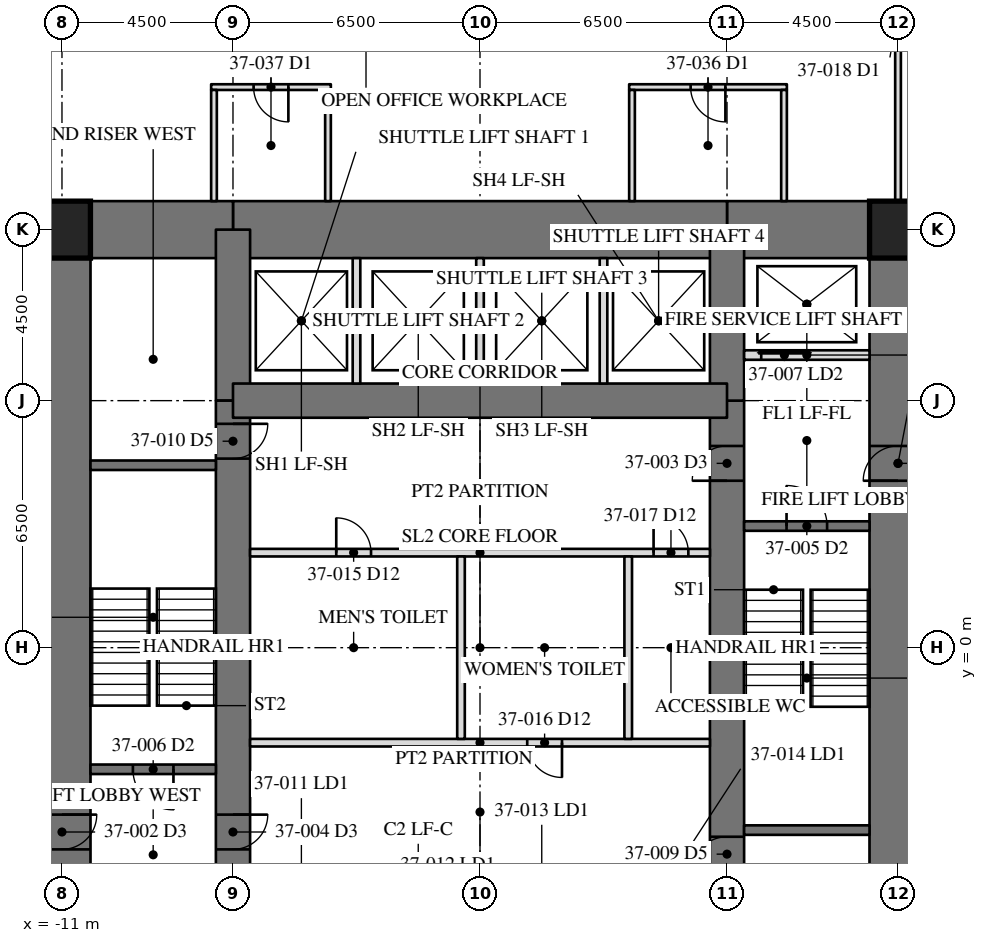
"""IFC4 building model, lengths in metres.
Left out: names, types, materials, properties, quantities, classifications, styles, units other than length and angle.
Written with IfcOpenShell. Run it as: python <this file> out.ifc"""

import sys

from ifc_helpers import new_model, si_unit, direction, frame, frame_2d, origin, origin_2d, place, context, subcontext, project, spatial, rectangle, hollow_rectangle, extrude, element, fill, save


model = new_model("IFC4")
c1 = context("Model", 3, precision=1e-05, world=origin(), true_north=direction((0.0, 1.0)))
c2 = subcontext(c1, "Body", "Model", "MODEL_VIEW")
j1 = project(units=[si_unit("LENGTHUNIT", "METRE"), si_unit("PLANEANGLEUNIT", "RADIAN")], contexts=[c1])
p1 = place(None, origin())
s1 = spatial("IfcSite", under=j1, at=p1, CompositionType="ELEMENT")
p2 = place(p1, origin())
s2 = spatial("IfcBuilding", under=s1, at=p2, CompositionType="ELEMENT")
p3 = place(p2, frame((0.0, 0.0, 158.2)))
s3 = spatial("IfcBuildingStorey", under=s2, at=p3, CompositionType="ELEMENT", Elevation=158.2)
p4 = place(p3, frame((11.0, -11.0, 0.0), z_axis=(0.0, 0.0, 1.0), x_axis=(0.0, 1.0, 0.0)))
e1 = element("IfcWall", 1, at=p4, inside=s3, PredefinedType="SHEAR", context=c2, shape_type="SweptSolid", body=[
    extrude(rectangle(XDim=22.0, YDim=1.5, at=frame_2d((11.0, 0.0))), origin(), (0.0, 0.0, 1.0), 4.1),
])
p5 = place(p4, frame((15.393, 0.0, 0.0)))
e2 = element("IfcOpeningElement", 2, at=p5, cuts=e1, PredefinedType="OPENING", context=c2, shape_type="SweptSolid", body=[
    extrude(rectangle(XDim=0.915, YDim=2.134, at=frame_2d((0.458, 1.067))), frame((0.0, 0.76, 0.0), z_axis=(0.0, -1.0, 0.0), x_axis=(1.0, 0.0, 0.0)), (0.0, 0.0, 1.0), 1.52),
])
p6 = place(p3, frame((-11.0, 11.0, 0.0), z_axis=(0.0, 0.0, 1.0), x_axis=(0.0, -1.0, 0.0)))
e3 = element("IfcWall", 3, at=p6, inside=s3, PredefinedType="SHEAR", context=c2, shape_type="SweptSolid", body=[
    extrude(rectangle(XDim=22.0, YDim=1.5, at=frame_2d((11.0, 0.0))), origin(), (0.0, 0.0, 1.0), 4.1),
])
p7 = place(p6, frame((15.393, 0.0, 0.0)))
e4 = element("IfcOpeningElement", 4, at=p7, cuts=e3, PredefinedType="OPENING", context=c2, shape_type="SweptSolid", body=[
    extrude(rectangle(XDim=0.915, YDim=2.134, at=frame_2d((0.458, 1.067))), frame((0.0, 0.76, 0.0), z_axis=(0.0, -1.0, 0.0), x_axis=(1.0, 0.0, 0.0)), (0.0, 0.0, 1.0), 1.52),
])
p8 = place(p3, frame((11.0, 11.0, 0.0), z_axis=(0.0, 0.0, 1.0), x_axis=(-1.0, 0.0, 0.0)))
e5 = element("IfcWall", 5, at=p8, inside=s3, PredefinedType="SHEAR", context=c2, shape_type="SweptSolid", body=[
    extrude(rectangle(XDim=4.5, YDim=1.5, at=frame_2d((2.25, 0.0))), origin(), (0.0, 0.0, 1.0), 4.1),
])
p9 = place(p3, frame((6.5, 11.0, 0.0), z_axis=(0.0, 0.0, 1.0), x_axis=(-1.0, 0.0, 0.0)))
e6 = element("IfcWall", 6, at=p9, inside=s3, PredefinedType="SHEAR", context=c2, shape_type="SweptSolid", body=[
    extrude(rectangle(XDim=13.0, YDim=1.5, at=frame_2d((6.5, 0.0))), origin(), (0.0, 0.0, 1.0), 4.1),
])
p10 = place(p3, frame((-6.5, 11.0, 0.0), z_axis=(0.0, 0.0, 1.0), x_axis=(-1.0, 0.0, 0.0)))
e7 = element("IfcWall", 7, at=p10, inside=s3, PredefinedType="SHEAR", context=c2, shape_type="SweptSolid", body=[
    extrude(rectangle(XDim=4.5, YDim=1.5, at=frame_2d((2.25, 0.0))), origin(), (0.0, 0.0, 1.0), 4.1),
])
p11 = place(p3, frame((6.5, -6.5, 0.0), z_axis=(0.0, 0.0, 1.0), x_axis=(0.0, 1.0, 0.0)))
e8 = element("IfcWall", 8, at=p11, inside=s3, PredefinedType="SHEAR", context=c2, shape_type="SweptSolid", body=[
    extrude(rectangle(XDim=13.0, YDim=0.9, at=frame_2d((6.5, 0.0))), origin(), (0.0, 0.0, 1.0), 4.1),
])
p12 = place(p11, frame((10.893, 0.0, 0.0)))
e9 = element("IfcOpeningElement", 9, at=p12, cuts=e8, PredefinedType="OPENING", context=c2, shape_type="SweptSolid", body=[
    extrude(rectangle(XDim=0.915, YDim=2.134, at=frame_2d((0.458, 1.067))), frame((0.0, 0.46, 0.0), z_axis=(0.0, -1.0, 0.0), x_axis=(1.0, 0.0, 0.0)), (0.0, 0.0, 1.0), 0.92),
])
p13 = place(p11, frame((0.61, 0.0, 0.0)))
e10 = element("IfcOpeningElement", 10, at=p13, cuts=e8, PredefinedType="OPENING", context=c2, shape_type="SweptSolid", body=[
    extrude(rectangle(XDim=0.915, YDim=2.134, at=frame_2d((0.458, 1.067))), frame((0.0, 0.46, 0.0), z_axis=(0.0, -1.0, 0.0), x_axis=(1.0, 0.0, 0.0)), (0.0, 0.0, 1.0), 0.92),
])
for number, where, z_axis, x_axis in (
    (11, (6.5, 6.5, 0.0), (0.0, 0.0, 1.0), (0.0, 1.0, 0.0)),
    (12, (-6.5, 11.0, 0.0), (0.0, 0.0, 1.0), (0.0, -1.0, 0.0)),
):
    element("IfcWall", number, at=place(p3, frame(where, z_axis=z_axis, x_axis=x_axis)), inside=s3, PredefinedType="SHEAR", context=c2, shape_type="SweptSolid", body=[
        extrude(rectangle(XDim=4.5, YDim=0.9, at=frame_2d((2.25, 0.0))), origin(), (0.0, 0.0, 1.0), 4.1),
    ])
p14 = place(p3, frame((-6.5, 6.5, 0.0), z_axis=(0.0, 0.0, 1.0), x_axis=(0.0, -1.0, 0.0)))
e13 = element("IfcWall", 13, at=p14, inside=s3, PredefinedType="SHEAR", context=c2, shape_type="SweptSolid", body=[
    extrude(rectangle(XDim=13.0, YDim=0.9, at=frame_2d((6.5, 0.0))), origin(), (0.0, 0.0, 1.0), 4.1),
])
p15 = place(p14, frame((10.893, 0.0, 0.0)))
e14 = element("IfcOpeningElement", 14, at=p15, cuts=e13, PredefinedType="OPENING", context=c2, shape_type="SweptSolid", body=[
    extrude(rectangle(XDim=0.915, YDim=2.134, at=frame_2d((0.458, 1.067))), frame((0.0, 0.46, 0.0), z_axis=(0.0, -1.0, 0.0), x_axis=(1.0, 0.0, 0.0)), (0.0, 0.0, 1.0), 0.92),
])
p16 = place(p14, frame((0.61, 0.0, 0.0)))
e15 = element("IfcOpeningElement", 15, at=p16, cuts=e13, PredefinedType="OPENING", context=c2, shape_type="SweptSolid", body=[
    extrude(rectangle(XDim=0.915, YDim=2.134, at=frame_2d((0.458, 1.067))), frame((0.0, 0.46, 0.0), z_axis=(0.0, -1.0, 0.0), x_axis=(1.0, 0.0, 0.0)), (0.0, 0.0, 1.0), 0.92),
])
p17 = place(p3, frame((6.5, 6.5, 0.0), z_axis=(0.0, 0.0, 1.0), x_axis=(-1.0, 0.0, 0.0)))
e16 = element("IfcWall", 16, at=p17, inside=s3, PredefinedType="SHEAR", context=c2, shape_type="SweptSolid", body=[
    extrude(rectangle(XDim=13.0, YDim=0.9, at=frame_2d((6.5, 0.0))), origin(), (0.0, 0.0, 1.0), 4.1),
])
for number, where, z_axis, x_axis in (
    (17, (11.0, 11.0, 0.0), (0.0, 0.0, 1.0), (1.0, 0.0, 0.0)),
    (18, (-11.0, 11.0, 0.0), (0.0, 0.0, 1.0), (1.0, 0.0, 0.0)),
):
    element("IfcColumn", number, at=place(p3, frame(where, z_axis=z_axis, x_axis=x_axis)), inside=s3, PredefinedType="COLUMN", context=c2, shape_type="SweptSolid", body=[
        extrude(hollow_rectangle(XDim=1.499, YDim=1.499, WallThickness=0.102, at=origin_2d()), origin(), (0.0, 0.0, 1.0), 4.1),
    ])
for number, where, z_axis, x_axis in (
    (19, (6.95, -4.8, 0.0), (0.0, 0.0, 1.0), (1.0, 0.0, 0.0)),
    (20, (-6.95, 4.8, 0.0), (0.0, 0.0, 1.0), (-1.0, 0.0, 0.0)),
):
    element("IfcWall", number, at=place(p3, frame(where, z_axis=z_axis, x_axis=x_axis)), inside=s3, PredefinedType="SOLIDWALL", context=c2, shape_type="SweptSolid", body=[
        extrude(rectangle(XDim=3.3, YDim=0.25, at=frame_2d((1.65, 0.0))), origin(), (0.0, 0.0, 1.0), 3.91),
    ])
p18 = place(p3, frame((6.95, 3.2, 0.0), z_axis=(0.0, 0.0, 1.0), x_axis=(1.0, 0.0, 0.0)))
e21 = element("IfcWall", 21, at=p18, inside=s3, PredefinedType="SOLIDWALL", context=c2, shape_type="SweptSolid", body=[
    extrude(rectangle(XDim=3.3, YDim=0.25, at=frame_2d((1.65, 0.0))), origin(), (0.0, 0.0, 1.0), 3.91),
])
p19 = place(p18, frame((1.116, 0.0, 0.0)))
e22 = element("IfcOpeningElement", 22, at=p19, cuts=e21, PredefinedType="OPENING", context=c2, shape_type="SweptSolid", body=[
    extrude(rectangle(XDim=1.067, YDim=2.134, at=frame_2d((0.533, 1.067))), frame((0.0, 0.135, 0.0), z_axis=(0.0, -1.0, 0.0), x_axis=(1.0, 0.0, 0.0)), (0.0, 0.0, 1.0), 0.27),
])
p20 = place(p3, frame((-6.95, -3.2, 0.0), z_axis=(0.0, 0.0, 1.0), x_axis=(-1.0, 0.0, 0.0)))
e23 = element("IfcWall", 23, at=p20, inside=s3, PredefinedType="SOLIDWALL", context=c2, shape_type="SweptSolid", body=[
    extrude(rectangle(XDim=3.3, YDim=0.25, at=frame_2d((1.65, 0.0))), origin(), (0.0, 0.0, 1.0), 3.91),
])
p21 = place(p20, frame((1.116, 0.0, 0.0)))
e24 = element("IfcOpeningElement", 24, at=p21, cuts=e23, PredefinedType="OPENING", context=c2, shape_type="SweptSolid", body=[
    extrude(rectangle(XDim=1.067, YDim=2.134, at=frame_2d((0.533, 1.067))), frame((0.0, 0.135, 0.0), z_axis=(0.0, -1.0, 0.0), x_axis=(1.0, 0.0, 0.0)), (0.0, 0.0, 1.0), 0.27),
])
p22 = place(p3, frame((6.95, 7.7, 0.0), z_axis=(0.0, 0.0, 1.0), x_axis=(1.0, 0.0, 0.0)))
e25 = element("IfcWall", 25, at=p22, inside=s3, PredefinedType="PARTITIONING", context=c2, shape_type="SweptSolid", body=[
    extrude(rectangle(XDim=3.3, YDim=0.25, at=frame_2d((1.65, 0.0))), origin(), (0.0, 0.0, 1.0), 3.91),
])
p23 = place(p22, frame((0.45, 0.0, 0.0)))
e26 = element("IfcOpeningElement", 26, at=p23, cuts=e25, PredefinedType="OPENING", context=c2, shape_type="SweptSolid", body=[
    extrude(rectangle(XDim=1.219, YDim=2.134, at=frame_2d((0.609, 1.067))), frame((0.0, 0.135, 0.0), z_axis=(0.0, -1.0, 0.0), x_axis=(1.0, 0.0, 0.0)), (0.0, 0.0, 1.0), 0.27),
])
p24 = place(p3, frame((-6.05, 2.5, 0.0), z_axis=(0.0, 0.0, 1.0), x_axis=(1.0, 0.0, 0.0)))
e27 = element("IfcWall", 27, at=p24, inside=s3, PredefinedType="PARTITIONING", context=c2, shape_type="SweptSolid", body=[
    extrude(rectangle(XDim=12.1, YDim=0.2, at=frame_2d((6.05, 0.0))), origin(), (0.0, 0.0, 1.0), 3.91),
])
p25 = place(p24, frame((2.268, 0.0, 0.0)))
e28 = element("IfcOpeningElement", 28, at=p25, cuts=e27, PredefinedType="OPENING", context=c2, shape_type="SweptSolid", body=[
    extrude(rectangle(XDim=0.915, YDim=2.134, at=frame_2d((0.458, 1.067))), frame((0.0, 0.11, 0.0), z_axis=(0.0, -1.0, 0.0), x_axis=(1.0, 0.0, 0.0)), (0.0, 0.0, 1.0), 0.22),
])
p26 = place(p24, frame((10.617, 0.0, 0.0)))
e29 = element("IfcOpeningElement", 29, at=p26, cuts=e27, PredefinedType="OPENING", context=c2, shape_type="SweptSolid", body=[
    extrude(rectangle(XDim=0.915, YDim=2.134, at=frame_2d((0.458, 1.067))), frame((0.0, 0.11, 0.0), z_axis=(0.0, -1.0, 0.0), x_axis=(1.0, 0.0, 0.0)), (0.0, 0.0, 1.0), 0.22),
])
p27 = place(p3, frame((6.05, -2.5, 0.0), z_axis=(0.0, 0.0, 1.0), x_axis=(-1.0, 0.0, 0.0)))
e30 = element("IfcWall", 30, at=p27, inside=s3, PredefinedType="PARTITIONING", context=c2, shape_type="SweptSolid", body=[
    extrude(rectangle(XDim=12.1, YDim=0.2, at=frame_2d((6.05, 0.0))), origin(), (0.0, 0.0, 1.0), 3.91),
])
p28 = place(p27, frame((3.893, 0.0, 0.0)))
e31 = element("IfcOpeningElement", 31, at=p28, cuts=e30, PredefinedType="OPENING", context=c2, shape_type="SweptSolid", body=[
    extrude(rectangle(XDim=0.915, YDim=2.134, at=frame_2d((0.458, 1.067))), frame((0.0, 0.11, 0.0), z_axis=(0.0, -1.0, 0.0), x_axis=(1.0, 0.0, 0.0)), (0.0, 0.0, 1.0), 0.22),
])
for number, where, z_axis, x_axis in (
    (32, (-3.25, 6.95, 0.0), (0.0, 0.0, 1.0), (0.0, 1.0, 0.0)),
    (33, (0.0, 6.95, 0.0), (0.0, 0.0, 1.0), (0.0, 1.0, 0.0)),
    (34, (3.25, 6.95, 0.0), (0.0, 0.0, 1.0), (0.0, 1.0, 0.0)),
):
    element("IfcWall", number, at=place(p3, frame(where, z_axis=z_axis, x_axis=x_axis)), inside=s3, PredefinedType="PARTITIONING", context=c2, shape_type="SweptSolid", body=[
        extrude(rectangle(XDim=3.3, YDim=0.2, at=frame_2d((1.65, 0.0))), origin(), (0.0, 0.0, 1.0), 3.91),
    ])
for number, where, z_axis, x_axis in (
    (35, (-0.5, -2.4, 0.0), (0.0, 0.0, 1.0), (0.0, 1.0, 0.0)),
    (36, (3.9, -2.4, 0.0), (0.0, 0.0, 1.0), (0.0, 1.0, 0.0)),
):
    element("IfcWall", number, at=place(p3, frame(where, z_axis=z_axis, x_axis=x_axis)), inside=s3, PredefinedType="PARTITIONING", context=c2, shape_type="SweptSolid", body=[
        extrude(rectangle(XDim=4.8, YDim=0.2, at=frame_2d((2.4, 0.0))), origin(), (0.0, 0.0, 1.0), 3.91),
    ])
p29 = place(p3, frame((11.0, 11.75, 0.0), z_axis=(0.0, 0.0, 1.0), x_axis=(0.0, 1.0, 0.0)))
e37 = element("IfcWall", 37, at=p29, inside=s3, PredefinedType="PARTITIONING", context=c2, shape_type="SweptSolid", body=[
    extrude(rectangle(XDim=10.665, YDim=0.15, at=frame_2d((5.333, 0.0))), origin(), (0.0, 0.0, 1.0), 3.326),
])
p30 = place(p29, frame((4.518, 0.0, 0.0)))
e38 = element("IfcOpeningElement", 38, at=p30, cuts=e37, PredefinedType="OPENING", context=c2, shape_type="SweptSolid", body=[
    extrude(rectangle(XDim=0.915, YDim=2.134, at=frame_2d((0.458, 1.067))), frame((0.0, 0.085, 0.0), z_axis=(0.0, -1.0, 0.0), x_axis=(1.0, 0.0, 0.0)), (0.0, 0.0, 1.0), 0.17),
])
p31 = place(p3, frame((8.075, 14.75, 0.0), z_axis=(0.0, 0.0, 1.0), x_axis=(-1.0, 0.0, 0.0)))
e39 = element("IfcWall", 39, at=p31, inside=s3, PredefinedType="PARTITIONING", context=c2, shape_type="SweptSolid", body=[
    extrude(rectangle(XDim=4.15, YDim=0.15, at=frame_2d((2.075, 0.0))), origin(), (0.0, 0.0, 1.0), 3.91),
])
p32 = place(p31, frame((1.617, 0.0, 0.0)))
e40 = element("IfcOpeningElement", 40, at=p32, cuts=e39, PredefinedType="OPENING", context=c2, shape_type="SweptSolid", body=[
    extrude(rectangle(XDim=0.915, YDim=2.134, at=frame_2d((0.458, 1.067))), frame((0.0, 0.085, 0.0), z_axis=(0.0, -1.0, 0.0), x_axis=(1.0, 0.0, 0.0)), (0.0, 0.0, 1.0), 0.17),
])
for number, where, z_axis, x_axis in (
    (41, (8.0, 14.675, 0.0), (0.0, 0.0, 1.0), (0.0, -1.0, 0.0)),
    (42, (4.0, 14.675, 0.0), (0.0, 0.0, 1.0), (0.0, -1.0, 0.0)),
):
    element("IfcWall", number, at=place(p3, frame(where, z_axis=z_axis, x_axis=x_axis)), inside=s3, PredefinedType="PARTITIONING", context=c2, shape_type="SweptSolid", body=[
        extrude(rectangle(XDim=2.925, YDim=0.15, at=frame_2d((1.462, 0.0))), origin(), (0.0, 0.0, 1.0), 3.91),
    ])
p33 = place(p3, frame((-3.925, 14.75, 0.0), z_axis=(0.0, 0.0, 1.0), x_axis=(-1.0, 0.0, 0.0)))
e43 = element("IfcWall", 43, at=p33, inside=s3, PredefinedType="PARTITIONING", context=c2, shape_type="SweptSolid", body=[
    extrude(rectangle(XDim=3.15, YDim=0.15, at=frame_2d((1.575, 0.0))), origin(), (0.0, 0.0, 1.0), 3.91),
])
p34 = place(p33, frame((1.117, 0.0, 0.0)))
e44 = element("IfcOpeningElement", 44, at=p34, cuts=e43, PredefinedType="OPENING", context=c2, shape_type="SweptSolid", body=[
    extrude(rectangle(XDim=0.915, YDim=2.134, at=frame_2d((0.458, 1.067))), frame((0.0, 0.085, 0.0), z_axis=(0.0, -1.0, 0.0), x_axis=(1.0, 0.0, 0.0)), (0.0, 0.0, 1.0), 0.17),
])
for number, where, z_axis, x_axis in (
    (45, (-4.0, 14.675, 0.0), (0.0, 0.0, 1.0), (0.0, -1.0, 0.0)),
    (46, (-7.0, 14.675, 0.0), (0.0, 0.0, 1.0), (0.0, -1.0, 0.0)),
):
    element("IfcWall", number, at=place(p3, frame(where, z_axis=z_axis, x_axis=x_axis)), inside=s3, PredefinedType="PARTITIONING", context=c2, shape_type="SweptSolid", body=[
        extrude(rectangle(XDim=2.925, YDim=0.15, at=frame_2d((1.462, 0.0))), origin(), (0.0, 0.0, 1.0), 3.91),
    ])
p35 = place(p12, origin())
e47 = element("IfcDoor", 47, at=p35, inside=s3, OperationType="SINGLE_SWING_RIGHT", PredefinedType="DOOR", context=c2, shape_type="SweptSolid", body=[
    extrude(rectangle(XDim=0.915, YDim=2.134, at=frame_2d((0.458, 1.067))), frame((0.0, -0.375, 0.0), z_axis=(0.0, -1.0, 0.0), x_axis=(1.0, 0.0, 0.0)), (0.0, 0.0, 1.0), 0.05),
])
fill(e9, e47)
p36 = place(p15, origin())
e48 = element("IfcDoor", 48, at=p36, inside=s3, OperationType="SINGLE_SWING_RIGHT", PredefinedType="DOOR", context=c2, shape_type="SweptSolid", body=[
    extrude(rectangle(XDim=0.915, YDim=2.134, at=frame_2d((0.458, 1.067))), frame((0.0, -0.375, 0.0), z_axis=(0.0, -1.0, 0.0), x_axis=(1.0, 0.0, 0.0)), (0.0, 0.0, 1.0), 0.05),
])
fill(e14, e48)
p37 = place(p19, origin())
e49 = element("IfcDoor", 49, at=p37, inside=s3, OperationType="SINGLE_SWING_LEFT", PredefinedType="DOOR", context=c2, shape_type="SweptSolid", body=[
    extrude(rectangle(XDim=1.067, YDim=2.134, at=frame_2d((0.533, 1.067))), frame((0.0, 0.025, 0.0), z_axis=(0.0, -1.0, 0.0), x_axis=(1.0, 0.0, 0.0)), (0.0, 0.0, 1.0), 0.05),
])
fill(e22, e49)
p38 = place(p21, origin())
e50 = element("IfcDoor", 50, at=p38, inside=s3, OperationType="SINGLE_SWING_LEFT", PredefinedType="DOOR", context=c2, shape_type="SweptSolid", body=[
    extrude(rectangle(XDim=1.067, YDim=2.134, at=frame_2d((0.533, 1.067))), frame((0.0, 0.025, 0.0), z_axis=(0.0, -1.0, 0.0), x_axis=(1.0, 0.0, 0.0)), (0.0, 0.0, 1.0), 0.05),
])
fill(e24, e50)
p39 = place(p23, origin())
e51 = element("IfcDoor", 51, at=p39, inside=s3, OperationType="SLIDING_TO_LEFT", PredefinedType="DOOR", context=c2, shape_type="SweptSolid", body=[
    extrude(rectangle(XDim=1.219, YDim=2.134, at=frame_2d((0.609, 1.067))), frame((0.0, 0.025, 0.0), z_axis=(0.0, -1.0, 0.0), x_axis=(1.0, 0.0, 0.0)), (0.0, 0.0, 1.0), 0.05),
])
fill(e26, e51)
p40 = place(p13, origin())
e52 = element("IfcDoor", 52, at=p40, inside=s3, OperationType="SINGLE_SWING_RIGHT", PredefinedType="DOOR", context=c2, shape_type="SweptSolid", body=[
    extrude(rectangle(XDim=0.915, YDim=2.134, at=frame_2d((0.458, 1.067))), frame((0.0, -0.375, 0.0), z_axis=(0.0, -1.0, 0.0), x_axis=(1.0, 0.0, 0.0)), (0.0, 0.0, 1.0), 0.05),
])
fill(e10, e52)
p41 = place(p16, origin())
e53 = element("IfcDoor", 53, at=p41, inside=s3, OperationType="SINGLE_SWING_RIGHT", PredefinedType="DOOR", context=c2, shape_type="SweptSolid", body=[
    extrude(rectangle(XDim=0.915, YDim=2.134, at=frame_2d((0.458, 1.067))), frame((0.0, -0.375, 0.0), z_axis=(0.0, -1.0, 0.0), x_axis=(1.0, 0.0, 0.0)), (0.0, 0.0, 1.0), 0.05),
])
fill(e15, e53)
p42 = place(p25, origin())
e54 = element("IfcDoor", 54, at=p42, inside=s3, OperationType="SINGLE_SWING_LEFT", PredefinedType="DOOR", context=c2, shape_type="SweptSolid", body=[
    extrude(rectangle(XDim=0.915, YDim=2.134, at=frame_2d((0.458, 1.067))), frame((0.0, 0.025, 0.0), z_axis=(0.0, -1.0, 0.0), x_axis=(1.0, 0.0, 0.0)), (0.0, 0.0, 1.0), 0.05),
])
fill(e28, e54)
p43 = place(p28, origin())
e55 = element("IfcDoor", 55, at=p43, inside=s3, OperationType="SINGLE_SWING_LEFT", PredefinedType="DOOR", context=c2, shape_type="SweptSolid", body=[
    extrude(rectangle(XDim=0.915, YDim=2.134, at=frame_2d((0.458, 1.067))), frame((0.0, 0.025, 0.0), z_axis=(0.0, -1.0, 0.0), x_axis=(1.0, 0.0, 0.0)), (0.0, 0.0, 1.0), 0.05),
])
fill(e31, e55)
p44 = place(p26, origin())
e56 = element("IfcDoor", 56, at=p44, inside=s3, OperationType="SINGLE_SWING_LEFT", PredefinedType="DOOR", context=c2, shape_type="SweptSolid", body=[
    extrude(rectangle(XDim=0.915, YDim=2.134, at=frame_2d((0.458, 1.067))), frame((0.0, 0.025, 0.0), z_axis=(0.0, -1.0, 0.0), x_axis=(1.0, 0.0, 0.0)), (0.0, 0.0, 1.0), 0.05),
])
fill(e29, e56)
p45 = place(p32, origin())
e57 = element("IfcDoor", 57, at=p45, inside=s3, OperationType="SINGLE_SWING_LEFT", PredefinedType="DOOR", context=c2, shape_type="SweptSolid", body=[
    extrude(rectangle(XDim=0.915, YDim=2.134, at=frame_2d((0.458, 1.067))), frame((0.0, 0.025, 0.0), z_axis=(0.0, -1.0, 0.0), x_axis=(1.0, 0.0, 0.0)), (0.0, 0.0, 1.0), 0.05),
])
fill(e40, e57)
p46 = place(p34, origin())
e58 = element("IfcDoor", 58, at=p46, inside=s3, OperationType="SINGLE_SWING_LEFT", PredefinedType="DOOR", context=c2, shape_type="SweptSolid", body=[
    extrude(rectangle(XDim=0.915, YDim=2.134, at=frame_2d((0.458, 1.067))), frame((0.0, 0.025, 0.0), z_axis=(0.0, -1.0, 0.0), x_axis=(1.0, 0.0, 0.0)), (0.0, 0.0, 1.0), 0.05),
])
fill(e44, e58)
save(model, sys.argv[1])
